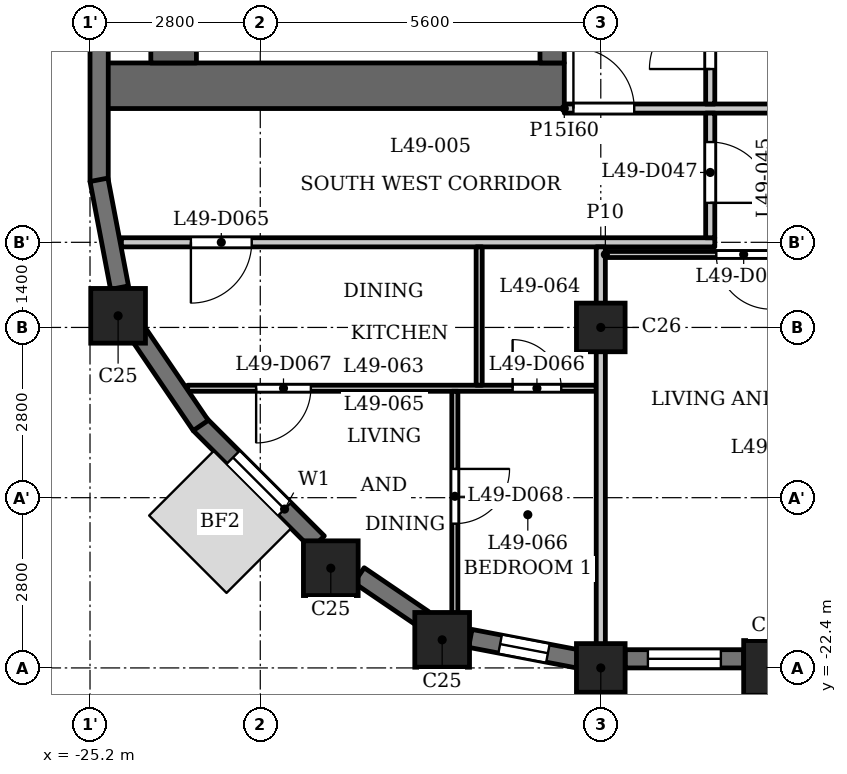
"""IFC4 building model, lengths in metres.
Left out: names, types, materials, properties, quantities, classifications, styles, units other than length and angle.
Written with IfcOpenShell. Run it as: python <this file> out.ifc"""

import sys

from ifc_helpers import new_model, si_unit, direction, frame, frame_2d, origin, origin_2d, place, context, subcontext, project, spatial, rectangle, extrude, element, fill, save


model = new_model("IFC4")
c1 = context("Model", 3, precision=1e-05, world=origin(), true_north=direction((0.0, 1.0)))
c2 = subcontext(c1, "Body", "Model", "MODEL_VIEW")
j1 = project(units=[si_unit("LENGTHUNIT", "METRE"), si_unit("PLANEANGLEUNIT", "RADIAN")], contexts=[c1])
p1 = place(None, origin())
s1 = spatial("IfcSite", under=j1, at=p1, CompositionType="ELEMENT")
p2 = place(p1, origin())
s2 = spatial("IfcBuilding", under=s1, at=p2, CompositionType="ELEMENT")
p3 = place(p2, frame((0.0, 0.0, 192.4)))
s3 = spatial("IfcBuildingStorey", under=s2, at=p3, CompositionType="ELEMENT", Elevation=192.4)
for number, where, z_axis, x_axis in (
    (1, (-19.409, -21.938, 0.0), (0.0, 0.0, 1.0), (1.0, 0.0, 0.0)),
    (2, (-14.0, -22.4, 0.0), (0.0, 0.0, 1.0), (1.0, 0.0, 0.0)),
    (3, (-24.738, -16.609, 0.0), (0.0, 0.0, 1.0), (1.0, 0.0, 0.0)),
    (4, (-21.24, -20.76, 0.0), (0.0, 0.0, 1.0), (1.0, 0.0, 0.0)),
):
    element("IfcColumn", number, at=place(p3, frame(where, z_axis=z_axis, x_axis=x_axis)), inside=s3, PredefinedType="COLUMN", context=c2, shape_type="SweptSolid", body=[
        extrude(rectangle(XDim=0.9, YDim=0.9, at=origin_2d()), origin(), (0.0, 0.0, 1.0), 3.5),
    ])
for number, where, z_axis, x_axis in (
    (5, (-16.8, -22.4, 0.0), (0.0, 0.0, 1.0), (1.0, 0.0, 0.0)),
    (6, (-16.8, -16.8, 0.0), (0.0, 0.0, 1.0), (1.0, 0.0, 0.0)),
):
    element("IfcColumn", number, at=place(p3, frame(where, z_axis=z_axis, x_axis=x_axis)), inside=s3, PredefinedType="COLUMN", context=c2, shape_type="SweptSolid", body=[
        extrude(rectangle(XDim=0.8, YDim=0.8, at=origin_2d()), origin(), (0.0, 0.0, 1.0), 3.5),
    ])
p4 = place(p3, frame((-23.397, -18.391, 0.0), z_axis=(0.0, 0.0, 1.0), x_axis=(0.707106781187, -0.707106781187, 0.0)))
e7 = element("IfcWall", 7, at=p4, inside=s3, PredefinedType="SOLIDWALL", context=c2, shape_type="SweptSolid", body=[
    extrude(rectangle(XDim=2.75, YDim=0.3, at=frame_2d((1.375, 0.0))), origin(), (0.0, 0.0, 1.0), 2.5),
])
p5 = place(p4, frame((0.775, 0.0, 0.6)))
e8 = element("IfcOpeningElement", 8, at=p5, cuts=e7, PredefinedType="OPENING", context=c2, shape_type="SweptSolid", body=[
    extrude(rectangle(XDim=1.2, YDim=1.55, at=frame_2d((0.6, 0.775))), frame((0.0, 0.16, 0.0), z_axis=(0.0, -1.0, 0.0), x_axis=(1.0, 0.0, 0.0)), (0.0, 0.0, 1.0), 0.32),
])
p6 = place(p3, frame((-20.775, -20.876, 0.0), z_axis=(0.0, 0.0, 1.0), x_axis=(0.827075824828, -0.562090366388, 0.0)))
e9 = element("IfcWall", 9, at=p6, inside=s3, PredefinedType="SOLIDWALL", context=c2, shape_type="SweptSolid", body=[
    extrude(rectangle(XDim=1.277, YDim=0.3, at=frame_2d((0.638, 0.0))), origin(), (0.0, 0.0, 1.0), 2.5),
])
p7 = place(p3, frame((-18.946, -21.914, 0.0), z_axis=(0.0, 0.0, 1.0), x_axis=(0.98230529033, -0.187286722942, 0.0)))
e10 = element("IfcWall", 10, at=p7, inside=s3, PredefinedType="SOLIDWALL", context=c2, shape_type="SweptSolid", body=[
    extrude(rectangle(XDim=1.799, YDim=0.3, at=frame_2d((0.899, 0.0))), origin(), (0.0, 0.0, 1.0), 2.5),
])
p8 = place(p7, frame((0.5, 0.0, 0.6)))
e11 = element("IfcOpeningElement", 11, at=p8, cuts=e10, PredefinedType="OPENING", context=c2, shape_type="SweptSolid", body=[
    extrude(rectangle(XDim=0.8, YDim=1.55, at=frame_2d((0.4, 0.775))), frame((0.0, 0.16, 0.0), z_axis=(0.0, -1.0, 0.0), x_axis=(1.0, 0.0, 0.0)), (0.0, 0.0, 1.0), 0.32),
])
p9 = place(p3, frame((-16.4, -22.25, 0.0), z_axis=(0.0, 0.0, 1.0), x_axis=(1.0, 0.0, 0.0)))
e12 = element("IfcWall", 12, at=p9, inside=s3, PredefinedType="SOLIDWALL", context=c2, shape_type="SweptSolid", body=[
    extrude(rectangle(XDim=1.95, YDim=0.3, at=frame_2d((0.975, 0.0))), origin(), (0.0, 0.0, 1.0), 2.5),
])
p10 = place(p9, frame((0.375, 0.0, 0.6)))
e13 = element("IfcOpeningElement", 13, at=p10, cuts=e12, PredefinedType="OPENING", context=c2, shape_type="SweptSolid", body=[
    extrude(rectangle(XDim=1.2, YDim=1.55, at=frame_2d((0.6, 0.775))), frame((0.0, 0.16, 0.0), z_axis=(0.0, -1.0, 0.0), x_axis=(1.0, 0.0, 0.0)), (0.0, 0.0, 1.0), 0.32),
])
p11 = place(p3, frame((-25.05, -11.65, 0.0), z_axis=(0.0, 0.0, 1.0), x_axis=(0.0, -1.0, 0.0)))
e14 = element("IfcWall", 14, at=p11, inside=s3, PredefinedType="SOLIDWALL", context=c2, shape_type="SweptSolid", body=[
    extrude(rectangle(XDim=2.75, YDim=0.3, at=frame_2d((1.375, 0.0))), origin(), (0.0, 0.0, 1.0), 2.5),
])
for number, where, z_axis, x_axis in (
    (15, (-25.053, -14.372, 0.0), (0.0, 0.0, 1.0), (0.187, -0.982, 0.0)),
    (16, (-24.394, -16.919, 0.0), (0.0, 0.0, 1.0), (0.562, -0.827, 0.0)),
):
    element("IfcWall", number, at=place(p3, frame(where, z_axis=z_axis, x_axis=x_axis)), inside=s3, PredefinedType="SOLIDWALL", context=c2, shape_type="SweptSolid", body=[
        extrude(rectangle(XDim=1.806, YDim=0.3, at=frame_2d((0.903, 0.0))), origin(), (0.0, 0.0, 1.0), 2.5),
    ])
p12 = place(p3, frame((-17.4, -12.825, 0.0), z_axis=(0.0, 0.0, 1.0), x_axis=(-1.0, 0.0, 0.0)))
e17 = element("IfcWall", 17, at=p12, inside=s3, PredefinedType="SHEAR", context=c2, shape_type="SweptSolid", body=[
    extrude(rectangle(XDim=7.6, YDim=0.75, at=frame_2d((3.8, 0.0))), origin(), (0.0, 0.0, 1.0), 3.2),
])
p13 = place(p3, frame((-17.6, -12.45, 0.0), z_axis=(0.0, 0.0, 1.0), x_axis=(0.0, 1.0, 0.0)))
e18 = element("IfcWall", 18, at=p13, inside=s3, PredefinedType="SHEAR", context=c2, shape_type="SweptSolid", body=[
    extrude(rectangle(XDim=24.9, YDim=0.4, at=frame_2d((12.45, 0.0))), origin(), (0.0, 0.0, 1.0), 3.2),
])
p14 = place(p13, frame((6.325, 0.0, 0.0)))
e19 = element("IfcOpeningElement", 19, at=p14, cuts=e18, PredefinedType="OPENING", context=c2, shape_type="SweptSolid", body=[
    extrude(rectangle(XDim=0.9, YDim=2.1, at=frame_2d((0.45, 1.05))), frame((0.0, 0.21, 0.0), z_axis=(0.0, -1.0, 0.0), x_axis=(1.0, 0.0, 0.0)), (0.0, 0.0, 1.0), 0.42),
])
p15 = place(p13, frame((9.925, 0.0, 0.0)))
e20 = element("IfcOpeningElement", 20, at=p15, cuts=e18, PredefinedType="OPENING", context=c2, shape_type="SweptSolid", body=[
    extrude(rectangle(XDim=0.9, YDim=2.1, at=frame_2d((0.45, 1.05))), frame((0.0, 0.21, 0.0), z_axis=(0.0, -1.0, 0.0), x_axis=(1.0, 0.0, 0.0)), (0.0, 0.0, 1.0), 0.42),
])
p16 = place(p13, frame((15.6, 0.0, 0.0)))
e21 = element("IfcOpeningElement", 21, at=p16, cuts=e18, PredefinedType="OPENING", context=c2, shape_type="SweptSolid", body=[
    extrude(rectangle(XDim=1.1, YDim=2.1, at=frame_2d((0.55, 1.05))), frame((0.0, 0.21, 0.0), z_axis=(0.0, -1.0, 0.0), x_axis=(1.0, 0.0, 0.0)), (0.0, 0.0, 1.0), 0.42),
])
p17 = place(p13, frame((18.0, 0.0, 0.0)))
e22 = element("IfcOpeningElement", 22, at=p17, cuts=e18, PredefinedType="OPENING", context=c2, shape_type="SweptSolid", body=[
    extrude(rectangle(XDim=1.1, YDim=2.1, at=frame_2d((0.55, 1.05))), frame((0.0, 0.21, 0.0), z_axis=(0.0, -1.0, 0.0), x_axis=(1.0, 0.0, 0.0)), (0.0, 0.0, 1.0), 0.42),
])
p18 = place(p13, frame((23.025, 0.0, 0.0)))
e23 = element("IfcOpeningElement", 23, at=p18, cuts=e18, PredefinedType="OPENING", context=c2, shape_type="SweptSolid", body=[
    extrude(rectangle(XDim=1.1, YDim=2.1, at=frame_2d((0.55, 1.05))), frame((0.0, 0.21, 0.0), z_axis=(0.0, -1.0, 0.0), x_axis=(1.0, 0.0, 0.0)), (0.0, 0.0, 1.0), 0.42),
])
p19 = place(p13, frame((0.775, 0.0, 0.0)))
e24 = element("IfcOpeningElement", 24, at=p19, cuts=e18, PredefinedType="OPENING", context=c2, shape_type="SweptSolid", body=[
    extrude(rectangle(XDim=1.1, YDim=2.1, at=frame_2d((0.55, 1.05))), frame((0.0, 0.21, 0.0), z_axis=(0.0, -1.0, 0.0), x_axis=(1.0, 0.0, 0.0)), (0.0, 0.0, 1.0), 0.42),
])
p20 = place(p13, frame((12.925, 0.0, 0.0)))
e25 = element("IfcOpeningElement", 25, at=p20, cuts=e18, PredefinedType="OPENING", context=c2, shape_type="SweptSolid", body=[
    extrude(rectangle(XDim=1.8, YDim=2.1, at=frame_2d((0.9, 1.05))), frame((0.0, 0.21, 0.0), z_axis=(0.0, -1.0, 0.0), x_axis=(1.0, 0.0, 0.0)), (0.0, 0.0, 1.0), 0.42),
])
p21 = place(p3, frame((-23.825, -12.45, 0.0), z_axis=(0.0, 0.0, 1.0), x_axis=(0.0, 1.0, 0.0)))
e26 = element("IfcWall", 26, at=p21, inside=s3, PredefinedType="SHEAR", context=c2, shape_type="SweptSolid", body=[
    extrude(rectangle(XDim=24.9, YDim=0.75, at=frame_2d((12.45, 0.0))), origin(), (0.0, 0.0, 1.0), 3.2),
])
p22 = place(p3, frame((-23.594, -17.8, 0.0), z_axis=(0.0, 0.0, 1.0), x_axis=(1.0, 0.0, 0.0)))
e27 = element("IfcWall", 27, at=p22, inside=s3, PredefinedType="PARTITIONING", context=c2, shape_type="SweptSolid", body=[
    extrude(rectangle(XDim=6.719, YDim=0.1, at=frame_2d((3.359, 0.0))), origin(), (0.0, 0.0, 1.0), 3.2),
])
p23 = place(p22, frame((5.344, 0.0, 0.0)))
e28 = element("IfcOpeningElement", 28, at=p23, cuts=e27, PredefinedType="OPENING", context=c2, shape_type="SweptSolid", body=[
    extrude(rectangle(XDim=0.8, YDim=2.1, at=frame_2d((0.4, 1.05))), frame((0.0, 0.06, 0.0), z_axis=(0.0, -1.0, 0.0), x_axis=(1.0, 0.0, 0.0)), (0.0, 0.0, 1.0), 0.12),
])
p24 = place(p22, frame((1.126, 0.0, 0.0)))
e29 = element("IfcOpeningElement", 29, at=p24, cuts=e27, PredefinedType="OPENING", context=c2, shape_type="SweptSolid", body=[
    extrude(rectangle(XDim=0.9, YDim=2.1, at=frame_2d((0.45, 1.05))), frame((0.0, 0.06, 0.0), z_axis=(0.0, -1.0, 0.0), x_axis=(1.0, 0.0, 0.0)), (0.0, 0.0, 1.0), 0.12),
])
p25 = place(p3, frame((-16.725, -15.6, 0.0), z_axis=(0.0, 0.0, 1.0), x_axis=(1.0, 0.0, 0.0)))
e30 = element("IfcWall", 30, at=p25, inside=s3, PredefinedType="PARTITIONING", context=c2, shape_type="SweptSolid", body=[
    extrude(rectangle(XDim=33.45, YDim=0.1, at=frame_2d((16.725, 0.0))), origin(), (0.0, 0.0, 1.0), 3.2),
])
p26 = place(p25, frame((4.075, 0.0, 0.0)))
e31 = element("IfcOpeningElement", 31, at=p26, cuts=e30, PredefinedType="OPENING", context=c2, shape_type="SweptSolid", body=[
    extrude(rectangle(XDim=0.8, YDim=2.1, at=frame_2d((0.4, 1.05))), frame((0.0, 0.06, 0.0), z_axis=(0.0, -1.0, 0.0), x_axis=(1.0, 0.0, 0.0)), (0.0, 0.0, 1.0), 0.12),
])
p27 = place(p25, frame((1.825, 0.0, 0.0)))
e32 = element("IfcOpeningElement", 32, at=p27, cuts=e30, PredefinedType="OPENING", context=c2, shape_type="SweptSolid", body=[
    extrude(rectangle(XDim=0.9, YDim=2.1, at=frame_2d((0.45, 1.05))), frame((0.0, 0.06, 0.0), z_axis=(0.0, -1.0, 0.0), x_axis=(1.0, 0.0, 0.0)), (0.0, 0.0, 1.0), 0.12),
])
p28 = place(p25, frame((9.675, 0.0, 0.0)))
e33 = element("IfcOpeningElement", 33, at=p28, cuts=e30, PredefinedType="OPENING", context=c2, shape_type="SweptSolid", body=[
    extrude(rectangle(XDim=0.8, YDim=2.1, at=frame_2d((0.4, 1.05))), frame((0.0, 0.06, 0.0), z_axis=(0.0, -1.0, 0.0), x_axis=(1.0, 0.0, 0.0)), (0.0, 0.0, 1.0), 0.12),
])
p29 = place(p25, frame((14.025, 0.0, 0.0)))
e34 = element("IfcOpeningElement", 34, at=p29, cuts=e30, PredefinedType="OPENING", context=c2, shape_type="SweptSolid", body=[
    extrude(rectangle(XDim=0.9, YDim=2.1, at=frame_2d((0.45, 1.05))), frame((0.0, 0.06, 0.0), z_axis=(0.0, -1.0, 0.0), x_axis=(1.0, 0.0, 0.0)), (0.0, 0.0, 1.0), 0.12),
])
p30 = place(p25, frame((20.875, 0.0, 0.0)))
e35 = element("IfcOpeningElement", 35, at=p30, cuts=e30, PredefinedType="OPENING", context=c2, shape_type="SweptSolid", body=[
    extrude(rectangle(XDim=0.8, YDim=2.1, at=frame_2d((0.4, 1.05))), frame((0.0, 0.06, 0.0), z_axis=(0.0, -1.0, 0.0), x_axis=(1.0, 0.0, 0.0)), (0.0, 0.0, 1.0), 0.12),
])
p31 = place(p25, frame((25.225, 0.0, 0.0)))
e36 = element("IfcOpeningElement", 36, at=p31, cuts=e30, PredefinedType="OPENING", context=c2, shape_type="SweptSolid", body=[
    extrude(rectangle(XDim=0.9, YDim=2.1, at=frame_2d((0.45, 1.05))), frame((0.0, 0.06, 0.0), z_axis=(0.0, -1.0, 0.0), x_axis=(1.0, 0.0, 0.0)), (0.0, 0.0, 1.0), 0.12),
])
p32 = place(p25, frame((28.475, 0.0, 0.0)))
e37 = element("IfcOpeningElement", 37, at=p32, cuts=e30, PredefinedType="OPENING", context=c2, shape_type="SweptSolid", body=[
    extrude(rectangle(XDim=0.8, YDim=2.1, at=frame_2d((0.4, 1.05))), frame((0.0, 0.06, 0.0), z_axis=(0.0, -1.0, 0.0), x_axis=(1.0, 0.0, 0.0)), (0.0, 0.0, 1.0), 0.12),
])
p33 = place(p25, frame((30.675, 0.0, 0.0)))
e38 = element("IfcOpeningElement", 38, at=p33, cuts=e30, PredefinedType="OPENING", context=c2, shape_type="SweptSolid", body=[
    extrude(rectangle(XDim=0.9, YDim=2.1, at=frame_2d((0.45, 1.05))), frame((0.0, 0.06, 0.0), z_axis=(0.0, -1.0, 0.0), x_axis=(1.0, 0.0, 0.0)), (0.0, 0.0, 1.0), 0.12),
])
p34 = place(p3, frame((-24.684, -15.4, 0.0), z_axis=(0.0, 0.0, 1.0), x_axis=(1.0, 0.0, 0.0)))
e39 = element("IfcWall", 39, at=p34, inside=s3, PredefinedType="PARTITIONING", context=c2, shape_type="SweptSolid", body=[
    extrude(rectangle(XDim=9.759, YDim=0.15, at=frame_2d((4.879, 0.0))), origin(), (0.0, 0.0, 1.0), 3.2),
])
p35 = place(p34, frame((1.143, 0.0, 0.0)))
e40 = element("IfcOpeningElement", 40, at=p35, cuts=e39, PredefinedType="OPENING", context=c2, shape_type="SweptSolid", body=[
    extrude(rectangle(XDim=1.0, YDim=2.1, at=frame_2d((0.5, 1.05))), frame((0.0, 0.085, 0.0), z_axis=(0.0, -1.0, 0.0), x_axis=(1.0, 0.0, 0.0)), (0.0, 0.0, 1.0), 0.17),
])
p36 = place(p3, frame((-17.4, -13.2, 0.0), z_axis=(0.0, 0.0, 1.0), x_axis=(1.0, 0.0, 0.0)))
e41 = element("IfcWall", 41, at=p36, inside=s3, PredefinedType="PARTITIONING", context=c2, shape_type="SweptSolid", body=[
    extrude(rectangle(XDim=34.8, YDim=0.15, at=frame_2d((17.4, 0.0))), origin(), (0.0, 0.0, 1.0), 3.2),
])
p37 = place(p36, frame((0.15, 0.0, 0.0)))
e42 = element("IfcOpeningElement", 42, at=p37, cuts=e41, PredefinedType="OPENING", context=c2, shape_type="SweptSolid", body=[
    extrude(rectangle(XDim=1.0, YDim=2.1, at=frame_2d((0.5, 1.05))), frame((0.0, 0.085, 0.0), z_axis=(0.0, -1.0, 0.0), x_axis=(1.0, 0.0, 0.0)), (0.0, 0.0, 1.0), 0.17),
])
p38 = place(p36, frame((33.55, 0.0, 0.0)))
e43 = element("IfcOpeningElement", 43, at=p38, cuts=e41, PredefinedType="OPENING", context=c2, shape_type="SweptSolid", body=[
    extrude(rectangle(XDim=1.0, YDim=2.1, at=frame_2d((0.5, 1.05))), frame((0.0, 0.085, 0.0), z_axis=(0.0, -1.0, 0.0), x_axis=(1.0, 0.0, 0.0)), (0.0, 0.0, 1.0), 0.17),
])
p39 = place(p36, frame((15.7, 0.0, 0.0)))
e44 = element("IfcOpeningElement", 44, at=p39, cuts=e41, PredefinedType="OPENING", context=c2, shape_type="SweptSolid", body=[
    extrude(rectangle(XDim=1.0, YDim=2.1, at=frame_2d((0.5, 1.05))), frame((0.0, 0.085, 0.0), z_axis=(0.0, -1.0, 0.0), x_axis=(1.0, 0.0, 0.0)), (0.0, 0.0, 1.0), 0.17),
])
p40 = place(p36, frame((26.9, 0.0, 0.0)))
e45 = element("IfcOpeningElement", 45, at=p40, cuts=e41, PredefinedType="OPENING", context=c2, shape_type="SweptSolid", body=[
    extrude(rectangle(XDim=1.0, YDim=2.1, at=frame_2d((0.5, 1.05))), frame((0.0, 0.085, 0.0), z_axis=(0.0, -1.0, 0.0), x_axis=(1.0, 0.0, 0.0)), (0.0, 0.0, 1.0), 0.17),
])
p41 = place(p3, frame((-19.2, -21.92, 0.0), z_axis=(0.0, 0.0, 1.0), x_axis=(0.0, 1.0, 0.0)))
e46 = element("IfcWall", 46, at=p41, inside=s3, PredefinedType="PARTITIONING", context=c2, shape_type="SweptSolid", body=[
    extrude(rectangle(XDim=4.07, YDim=0.1, at=frame_2d((2.035, 0.0))), origin(), (0.0, 0.0, 1.0), 3.2),
])
p42 = place(p41, frame((1.893, 0.0, 0.0)))
e47 = element("IfcOpeningElement", 47, at=p42, cuts=e46, PredefinedType="OPENING", context=c2, shape_type="SweptSolid", body=[
    extrude(rectangle(XDim=0.9, YDim=2.1, at=frame_2d((0.45, 1.05))), frame((0.0, 0.06, 0.0), z_axis=(0.0, -1.0, 0.0), x_axis=(1.0, 0.0, 0.0)), (0.0, 0.0, 1.0), 0.12),
])
p43 = place(p3, frame((-18.8, -17.75, 0.0), z_axis=(0.0, 0.0, 1.0), x_axis=(0.0, 1.0, 0.0)))
e48 = element("IfcWall", 48, at=p43, inside=s3, PredefinedType="PARTITIONING", context=c2, shape_type="SweptSolid", body=[
    extrude(rectangle(XDim=2.275, YDim=0.1, at=frame_2d((1.137, 0.0))), origin(), (0.0, 0.0, 1.0), 3.2),
])
p44 = place(p3, frame((-16.8, -22.31, 0.0), z_axis=(0.0, 0.0, 1.0), x_axis=(0.0, 1.0, 0.0)))
e49 = element("IfcWall", 49, at=p44, inside=s3, PredefinedType="PARTITIONING", context=c2, shape_type="SweptSolid", body=[
    extrude(rectangle(XDim=6.835, YDim=0.15, at=frame_2d((3.417, 0.0))), origin(), (0.0, 0.0, 1.0), 2.55),
])
p45 = place(p3, frame((-15.0, -15.325, 0.0), z_axis=(0.0, 0.0, 1.0), x_axis=(0.0, 1.0, 0.0)))
e50 = element("IfcWall", 50, at=p45, inside=s3, PredefinedType="PARTITIONING", context=c2, shape_type="SweptSolid", body=[
    extrude(rectangle(XDim=2.05, YDim=0.15, at=frame_2d((1.025, 0.0))), origin(), (0.0, 0.0, 1.0), 3.2),
])
p46 = place(p45, frame((0.574, 0.0, 0.0)))
e51 = element("IfcOpeningElement", 51, at=p46, cuts=e50, PredefinedType="OPENING", context=c2, shape_type="SweptSolid", body=[
    extrude(rectangle(XDim=1.0, YDim=2.1, at=frame_2d((0.5, 1.05))), frame((0.0, 0.085, 0.0), z_axis=(0.0, -1.0, 0.0), x_axis=(1.0, 0.0, 0.0)), (0.0, 0.0, 1.0), 0.17),
])
p47 = place(p3, frame((-15.0, -13.125, 0.0), z_axis=(0.0, 0.0, 1.0), x_axis=(0.0, 1.0, 0.0)))
e52 = element("IfcWall", 52, at=p47, inside=s3, PredefinedType="PARTITIONING", context=c2, shape_type="SweptSolid", body=[
    extrude(rectangle(XDim=6.356, YDim=0.15, at=frame_2d((3.178, 0.0))), origin(), (0.0, 0.0, 1.0), 3.2),
])
p48 = place(p47, frame((0.575, 0.0, 0.0)))
e53 = element("IfcOpeningElement", 53, at=p48, cuts=e52, PredefinedType="OPENING", context=c2, shape_type="SweptSolid", body=[
    extrude(rectangle(XDim=1.0, YDim=2.1, at=frame_2d((0.5, 1.05))), frame((0.0, 0.085, 0.0), z_axis=(0.0, -1.0, 0.0), x_axis=(1.0, 0.0, 0.0)), (0.0, 0.0, 1.0), 0.17),
])
p49 = place(p48, origin())
e54 = element("IfcDoor", 54, at=p49, inside=s3, OperationType="SINGLE_SWING_RIGHT", PredefinedType="DOOR", context=c2, shape_type="SweptSolid", body=[
    extrude(rectangle(XDim=1.0, YDim=2.1, at=frame_2d((0.5, 1.05))), frame((0.0, 0.025, 0.0), z_axis=(0.0, -1.0, 0.0), x_axis=(1.0, 0.0, 0.0)), (0.0, 0.0, 1.0), 0.05),
])
fill(e53, e54)
p50 = place(p37, origin())
e55 = element("IfcDoor", 55, at=p50, inside=s3, OperationType="SINGLE_SWING_RIGHT", PredefinedType="DOOR", context=c2, shape_type="SweptSolid", body=[
    extrude(rectangle(XDim=1.0, YDim=2.1, at=frame_2d((0.5, 1.05))), frame((0.0, 0.025, 0.0), z_axis=(0.0, -1.0, 0.0), x_axis=(1.0, 0.0, 0.0)), (0.0, 0.0, 1.0), 0.05),
])
fill(e42, e55)
p51 = place(p46, origin())
e56 = element("IfcDoor", 56, at=p51, inside=s3, OperationType="SINGLE_SWING_LEFT", PredefinedType="DOOR", context=c2, shape_type="SweptSolid", body=[
    extrude(rectangle(XDim=1.0, YDim=2.1, at=frame_2d((0.5, 1.05))), frame((0.0, 0.025, 0.0), z_axis=(0.0, -1.0, 0.0), x_axis=(1.0, 0.0, 0.0)), (0.0, 0.0, 1.0), 0.05),
])
fill(e51, e56)
p52 = place(p27, origin())
e57 = element("IfcDoor", 57, at=p52, inside=s3, OperationType="SINGLE_SWING_RIGHT", PredefinedType="DOOR", context=c2, shape_type="SweptSolid", body=[
    extrude(rectangle(XDim=0.9, YDim=2.1, at=frame_2d((0.45, 1.05))), frame((0.0, 0.025, 0.0), z_axis=(0.0, -1.0, 0.0), x_axis=(1.0, 0.0, 0.0)), (0.0, 0.0, 1.0), 0.05),
])
fill(e32, e57)
p53 = place(p35, origin())
e58 = element("IfcDoor", 58, at=p53, inside=s3, OperationType="SINGLE_SWING_LEFT", PredefinedType="DOOR", context=c2, shape_type="SweptSolid", body=[
    extrude(rectangle(XDim=1.0, YDim=2.1, at=frame_2d((0.5, 1.05))), frame((0.0, 0.025, 0.0), z_axis=(0.0, -1.0, 0.0), x_axis=(1.0, 0.0, 0.0)), (0.0, 0.0, 1.0), 0.05),
])
fill(e40, e58)
p54 = place(p23, origin())
e59 = element("IfcDoor", 59, at=p54, inside=s3, OperationType="SINGLE_SWING_RIGHT", PredefinedType="DOOR", context=c2, shape_type="SweptSolid", body=[
    extrude(rectangle(XDim=0.8, YDim=2.1, at=frame_2d((0.4, 1.05))), frame((0.0, 0.025, 0.0), z_axis=(0.0, -1.0, 0.0), x_axis=(1.0, 0.0, 0.0)), (0.0, 0.0, 1.0), 0.05),
])
fill(e28, e59)
p55 = place(p24, origin())
e60 = element("IfcDoor", 60, at=p55, inside=s3, OperationType="SINGLE_SWING_LEFT", PredefinedType="DOOR", context=c2, shape_type="SweptSolid", body=[
    extrude(rectangle(XDim=0.9, YDim=2.1, at=frame_2d((0.45, 1.05))), frame((0.0, 0.025, 0.0), z_axis=(0.0, -1.0, 0.0), x_axis=(1.0, 0.0, 0.0)), (0.0, 0.0, 1.0), 0.05),
])
fill(e29, e60)
p56 = place(p42, origin())
e61 = element("IfcDoor", 61, at=p56, inside=s3, OperationType="SINGLE_SWING_RIGHT", PredefinedType="DOOR", context=c2, shape_type="SweptSolid", body=[
    extrude(rectangle(XDim=0.9, YDim=2.1, at=frame_2d((0.45, 1.05))), frame((0.0, 0.025, 0.0), z_axis=(0.0, -1.0, 0.0), x_axis=(1.0, 0.0, 0.0)), (0.0, 0.0, 1.0), 0.05),
])
fill(e47, e61)
p57 = place(p5, origin())
e62 = element("IfcWindow", 62, at=p57, inside=s3, PartitioningType="SINGLE_PANEL", PredefinedType="WINDOW", context=c2, shape_type="SweptSolid", body=[
    extrude(rectangle(XDim=1.2, YDim=1.55, at=frame_2d((0.6, 0.775))), frame((0.0, 0.03, 0.0), z_axis=(0.0, -1.0, 0.0), x_axis=(1.0, 0.0, 0.0)), (0.0, 0.0, 1.0), 0.06),
])
fill(e8, e62)
p58 = place(p8, origin())
e63 = element("IfcWindow", 63, at=p58, inside=s3, PartitioningType="SINGLE_PANEL", PredefinedType="WINDOW", context=c2, shape_type="SweptSolid", body=[
    extrude(rectangle(XDim=0.8, YDim=1.55, at=frame_2d((0.4, 0.775))), frame((0.0, 0.03, 0.0), z_axis=(0.0, -1.0, 0.0), x_axis=(1.0, 0.0, 0.0)), (0.0, 0.0, 1.0), 0.06),
])
fill(e11, e63)
p59 = place(p10, origin())
e64 = element("IfcWindow", 64, at=p59, inside=s3, PartitioningType="SINGLE_PANEL", PredefinedType="WINDOW", context=c2, shape_type="SweptSolid", body=[
    extrude(rectangle(XDim=1.2, YDim=1.55, at=frame_2d((0.6, 0.775))), frame((0.0, 0.03, 0.0), z_axis=(0.0, -1.0, 0.0), x_axis=(1.0, 0.0, 0.0)), (0.0, 0.0, 1.0), 0.06),
])
fill(e13, e64)
save(model, sys.argv[1])
